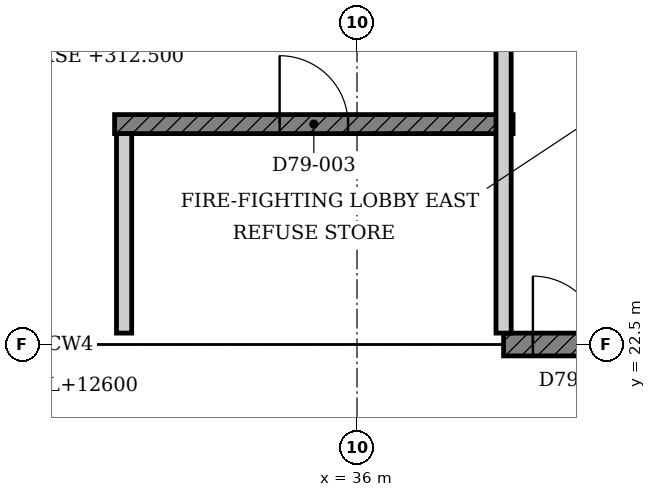
"""IFC4 building model, lengths in metres.
Left out: names, types, materials, properties, quantities, classifications, styles, units other than length and angle.
Written with IfcOpenShell. Run it as: python <this file> out.ifc"""

import sys

from ifc_helpers import new_model, si_unit, direction, frame, frame_2d, origin, place, context, subcontext, project, spatial, rectangle, extrude, element, fill, save


model = new_model("IFC4")
c1 = context("Model", 3, precision=1e-05, world=origin(), true_north=direction((0.0, 1.0)))
c2 = subcontext(c1, "Body", "Model", "MODEL_VIEW")
j1 = project(units=[si_unit("LENGTHUNIT", "METRE"), si_unit("PLANEANGLEUNIT", "RADIAN")], contexts=[c1])
p1 = place(None, origin())
s1 = spatial("IfcSite", under=j1, at=p1, CompositionType="ELEMENT")
p2 = place(p1, origin())
s2 = spatial("IfcBuilding", under=s1, at=p2, CompositionType="ELEMENT")
p3 = place(p2, frame((0.0, 0.0, 312.8)))
s3 = spatial("IfcBuildingStorey", under=s2, at=p3, CompositionType="ELEMENT", Elevation=312.8)
p4 = place(p3, frame((37.928, 22.5, 0.0), z_axis=(0.0, 0.0, 1.0), x_axis=(1.0, 0.0, 0.0)))
e1 = element("IfcWall", 1, at=p4, inside=s3, PredefinedType="SHEAR", context=c2, shape_type="SweptSolid", body=[
    extrude(rectangle(XDim=6.922, YDim=0.3, at=frame_2d((3.461, 0.0))), origin(), (0.0, 0.0, 1.0), 3.1),
])
p5 = place(p4, frame((0.386, 0.0, 0.0)))
e2 = element("IfcOpeningElement", 2, at=p5, cuts=e1, PredefinedType="OPENING", context=c2, shape_type="SweptSolid", body=[
    extrude(rectangle(XDim=1.8, YDim=2.1, at=frame_2d((0.9, 1.05))), frame((0.0, 0.16, 0.0), z_axis=(0.0, -1.0, 0.0), x_axis=(1.0, 0.0, 0.0)), (0.0, 0.0, 1.0), 0.32),
])
p6 = place(p3, frame((32.811, 25.4, 0.0), z_axis=(0.0, 0.0, 1.0), x_axis=(1.0, 0.0, 0.0)))
e3 = element("IfcWall", 3, at=p6, inside=s3, PredefinedType="SHEAR", context=c2, shape_type="SweptSolid", body=[
    extrude(rectangle(XDim=5.243, YDim=0.25, at=frame_2d((2.621, 0.0))), origin(), (0.0, 0.0, 1.0), 3.9),
])
p7 = place(p6, frame((2.171, 0.0, 0.0)))
e4 = element("IfcOpeningElement", 4, at=p7, cuts=e3, PredefinedType="OPENING", context=c2, shape_type="SweptSolid", body=[
    extrude(rectangle(XDim=0.9, YDim=2.1, at=frame_2d((0.45, 1.05))), frame((0.0, 0.135, 0.0), z_axis=(0.0, -1.0, 0.0), x_axis=(1.0, 0.0, 0.0)), (0.0, 0.0, 1.0), 0.27),
])
p8 = place(p3, frame((32.936, 22.65, 0.0), z_axis=(0.0, 0.0, 1.0), x_axis=(0.0, 1.0, 0.0)))
e5 = element("IfcWall", 5, at=p8, inside=s3, PredefinedType="PARTITIONING", context=c2, shape_type="SweptSolid", body=[
    extrude(rectangle(XDim=2.625, YDim=0.2, at=frame_2d((1.312, 0.0))), origin(), (0.0, 0.0, 1.0), 3.9),
])
p9 = place(p3, frame((37.928, 22.65, 0.0), z_axis=(0.0, 0.0, 1.0), x_axis=(0.0, 1.0, 0.0)))
e6 = element("IfcWall", 6, at=p9, inside=s3, PredefinedType="PARTITIONING", context=c2, shape_type="SweptSolid", body=[
    extrude(rectangle(XDim=5.825, YDim=0.2, at=frame_2d((2.913, 0.0))), origin(), (0.0, 0.0, 1.0), 3.9),
])
p10 = place(p7, origin())
e7 = element("IfcDoor", 7, at=p10, inside=s3, OperationType="SINGLE_SWING_LEFT", PredefinedType="DOOR", context=c2, shape_type="SweptSolid", body=[
    extrude(rectangle(XDim=0.9, YDim=2.1, at=frame_2d((0.45, 1.05))), frame((0.0, 0.025, 0.0), z_axis=(0.0, -1.0, 0.0), x_axis=(1.0, 0.0, 0.0)), (0.0, 0.0, 1.0), 0.05),
])
fill(e4, e7)
p11 = place(p5, origin())
e8 = element("IfcDoor", 8, at=p11, inside=s3, OperationType="DOUBLE_DOOR_SINGLE_SWING", PredefinedType="DOOR", context=c2, shape_type="SweptSolid", body=[
    extrude(rectangle(XDim=1.8, YDim=2.1, at=frame_2d((0.9, 1.05))), frame((0.0, 0.025, 0.0), z_axis=(0.0, -1.0, 0.0), x_axis=(1.0, 0.0, 0.0)), (0.0, 0.0, 1.0), 0.05),
])
fill(e2, e8)
save(model, sys.argv[1])
